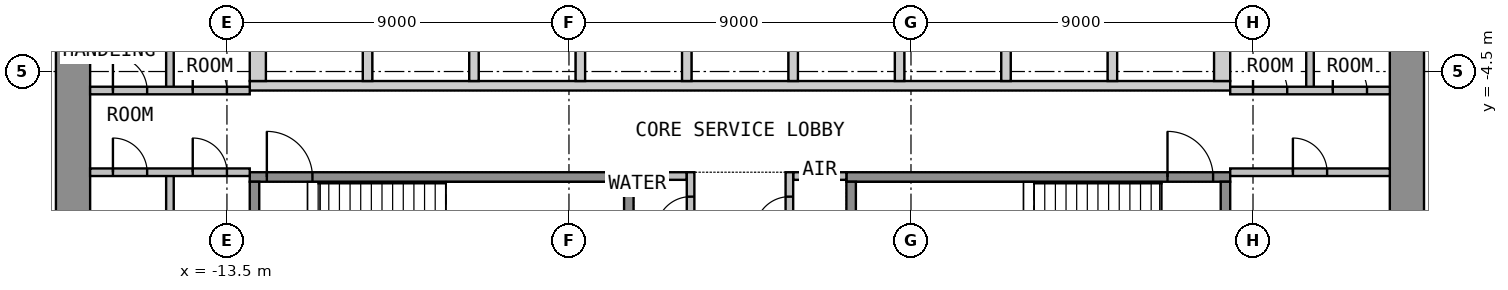
"""IFC4 building model, lengths in metres.
Left out: names, types, materials, properties, quantities, classifications, styles, units other than length and angle.
Written with IfcOpenShell. Run it as: python <this file> out.ifc"""

import sys

from ifc_helpers import new_model, si_unit, direction, frame, frame_2d, origin, place, context, subcontext, project, spatial, polyline, rectangle, outline, extrude, element, fill, save


model = new_model("IFC4")
c1 = context("Model", 3, precision=1e-05, world=origin(), true_north=direction((0.0, 1.0)))
c2 = subcontext(c1, "Body", "Model", "MODEL_VIEW")
j1 = project(units=[si_unit("LENGTHUNIT", "METRE"), si_unit("PLANEANGLEUNIT", "RADIAN")], contexts=[c1])
p1 = place(None, origin())
s1 = spatial("IfcSite", under=j1, at=p1, CompositionType="ELEMENT")
p2 = place(p1, origin())
s2 = spatial("IfcBuilding", under=s1, at=p2, CompositionType="ELEMENT")
p3 = place(p2, frame((0.0, 0.0, 76.8)))
s3 = spatial("IfcBuildingStorey", under=s2, at=p3, CompositionType="ELEMENT", Elevation=76.8)
p4 = place(p3, frame((-17.55, -12.6, 0.0), z_axis=(0.0, 0.0, 1.0), x_axis=(0.0, 1.0, 0.0)))
e1 = element("IfcWall", 1, at=p4, inside=s3, PredefinedType="SHEAR", context=c2, shape_type="SweptSolid", body=[
    extrude(rectangle(XDim=25.2, YDim=0.9, at=frame_2d((12.6, 0.0))), origin(), (0.0, 0.0, 1.0), 4.125),
])
p5 = place(p4, frame((11.4, 0.0, 0.0)))
e2 = element("IfcOpeningElement", 2, at=p5, cuts=e1, PredefinedType="OPENING", context=c2, shape_type="SweptSolid", body=[
    extrude(rectangle(XDim=2.4, YDim=2.1, at=frame_2d((1.2, 1.05))), frame((0.0, 0.46, 0.0), z_axis=(0.0, -1.0, 0.0), x_axis=(1.0, 0.0, 0.0)), (0.0, 0.0, 1.0), 0.92),
])
p6 = place(p3, frame((17.55, -12.6, 0.0), z_axis=(0.0, 0.0, 1.0), x_axis=(0.0, 1.0, 0.0)))
e3 = element("IfcWall", 3, at=p6, inside=s3, PredefinedType="SHEAR", context=c2, shape_type="SweptSolid", body=[
    extrude(rectangle(XDim=25.2, YDim=0.9, at=frame_2d((12.6, 0.0))), origin(), (0.0, 0.0, 1.0), 4.125),
])
p7 = place(p6, frame((11.4, 0.0, 0.0)))
e4 = element("IfcOpeningElement", 4, at=p7, cuts=e3, PredefinedType="OPENING", context=c2, shape_type="SweptSolid", body=[
    extrude(rectangle(XDim=2.4, YDim=2.1, at=frame_2d((1.2, 1.05))), frame((0.0, 0.46, 0.0), z_axis=(0.0, -1.0, 0.0), x_axis=(1.0, 0.0, 0.0)), (0.0, 0.0, 1.0), 0.92),
])
p8 = place(p3, origin())
e5 = element("IfcWall", 5, at=p8, inside=s3, PredefinedType="SHEAR", context=c2, shape_type="SweptSolid", body=[
    extrude(outline(polyline([(-12.9, -5.0), (12.9, -5.0), (12.9, -4.75), (-12.9, -4.75), (-12.9, -5.0)])), origin(), (0.0, 0.0, 1.0), 4.125),
])
p9 = place(p3, origin())
e6 = element("IfcWall", 6, at=p9, inside=s3, PredefinedType="SHEAR", context=c2, shape_type="SweptSolid", body=[
    extrude(outline(polyline([(-12.9, -4.75), (-12.475, -4.75), (-12.475, -2.05), (-12.9, -2.05), (-12.9, -4.75)])), origin(), (0.0, 0.0, 1.0), 4.125),
])
p10 = place(p3, origin())
e7 = element("IfcWall", 7, at=p10, inside=s3, PredefinedType="SHEAR", context=c2, shape_type="SweptSolid", body=[
    extrude(outline(polyline([(-9.925, -4.75), (-9.675, -4.75), (-9.675, -2.05), (-9.925, -2.05), (-9.925, -4.75)])), origin(), (0.0, 0.0, 1.0), 4.125),
])
p11 = place(p3, origin())
e8 = element("IfcWall", 8, at=p11, inside=s3, PredefinedType="SHEAR", context=c2, shape_type="SweptSolid", body=[
    extrude(outline(polyline([(-7.125, -4.75), (-6.875, -4.75), (-6.875, -2.05), (-7.125, -2.05), (-7.125, -4.75)])), origin(), (0.0, 0.0, 1.0), 4.125),
])
p12 = place(p3, origin())
e9 = element("IfcWall", 9, at=p12, inside=s3, PredefinedType="SHEAR", context=c2, shape_type="SweptSolid", body=[
    extrude(outline(polyline([(-4.325, -4.75), (-4.075, -4.75), (-4.075, -2.05), (-4.325, -2.05), (-4.325, -4.75)])), origin(), (0.0, 0.0, 1.0), 4.125),
])
p13 = place(p3, origin())
e10 = element("IfcWall", 10, at=p13, inside=s3, PredefinedType="SHEAR", context=c2, shape_type="SweptSolid", body=[
    extrude(outline(polyline([(-1.525, -4.75), (-1.275, -4.75), (-1.275, -2.05), (-1.525, -2.05), (-1.525, -4.75)])), origin(), (0.0, 0.0, 1.0), 4.125),
])
p14 = place(p3, origin())
e11 = element("IfcWall", 11, at=p14, inside=s3, PredefinedType="SHEAR", context=c2, shape_type="SweptSolid", body=[
    extrude(outline(polyline([(1.275, -4.75), (1.525, -4.75), (1.525, -2.05), (1.275, -2.05), (1.275, -4.75)])), origin(), (0.0, 0.0, 1.0), 4.125),
])
p15 = place(p3, origin())
e12 = element("IfcWall", 12, at=p15, inside=s3, PredefinedType="SHEAR", context=c2, shape_type="SweptSolid", body=[
    extrude(outline(polyline([(4.075, -4.75), (4.325, -4.75), (4.325, -2.05), (4.075, -2.05), (4.075, -4.75)])), origin(), (0.0, 0.0, 1.0), 4.125),
])
p16 = place(p3, origin())
e13 = element("IfcWall", 13, at=p16, inside=s3, PredefinedType="SHEAR", context=c2, shape_type="SweptSolid", body=[
    extrude(outline(polyline([(6.875, -4.75), (7.125, -4.75), (7.125, -2.05), (6.875, -2.05), (6.875, -4.75)])), origin(), (0.0, 0.0, 1.0), 4.125),
])
p17 = place(p3, origin())
e14 = element("IfcWall", 14, at=p17, inside=s3, PredefinedType="SHEAR", context=c2, shape_type="SweptSolid", body=[
    extrude(outline(polyline([(9.675, -4.75), (9.925, -4.75), (9.925, -2.05), (9.675, -2.05), (9.675, -4.75)])), origin(), (0.0, 0.0, 1.0), 4.125),
])
p18 = place(p3, origin())
e15 = element("IfcWall", 15, at=p18, inside=s3, PredefinedType="SHEAR", context=c2, shape_type="SweptSolid", body=[
    extrude(outline(polyline([(12.475, -4.75), (12.9, -4.75), (12.9, -2.05), (12.475, -2.05), (12.475, -4.75)])), origin(), (0.0, 0.0, 1.0), 4.125),
])
p19 = place(p3, frame((-12.9, -7.275, 0.0), z_axis=(0.0, 0.0, 1.0), x_axis=(1.0, 0.0, 0.0)))
e16 = element("IfcWall", 16, at=p19, inside=s3, PredefinedType="SHEAR", context=c2, shape_type="SweptSolid", body=[
    extrude(rectangle(XDim=10.1, YDim=0.25, at=frame_2d((5.05, 0.0))), origin(), (0.0, 0.0, 1.0), 4.125),
])
p20 = place(p19, frame((0.45, 0.0, 0.0)))
e17 = element("IfcOpeningElement", 17, at=p20, cuts=e16, PredefinedType="OPENING", context=c2, shape_type="SweptSolid", body=[
    extrude(rectangle(XDim=1.2, YDim=2.1, at=frame_2d((0.6, 1.05))), frame((0.0, 0.135, 0.0), z_axis=(0.0, -1.0, 0.0), x_axis=(1.0, 0.0, 0.0)), (0.0, 0.0, 1.0), 0.27),
])
for number, where, z_axis, x_axis in (
    (18, (-12.775, -10.65, 0.0), (0.0, 0.0, 1.0), (0.0, 1.0, 0.0)),
    (19, (-2.925, -10.65, 0.0), (0.0, 0.0, 1.0), (0.0, 1.0, 0.0)),
):
    element("IfcWall", number, at=place(p3, frame(where, z_axis=z_axis, x_axis=x_axis)), inside=s3, PredefinedType="SHEAR", context=c2, shape_type="SweptSolid", body=[
        extrude(rectangle(XDim=3.25, YDim=0.25, at=frame_2d((1.625, 0.0))), origin(), (0.0, 0.0, 1.0), 4.125),
    ])
p21 = place(p3, frame((2.8, -7.275, 0.0), z_axis=(0.0, 0.0, 1.0), x_axis=(1.0, 0.0, 0.0)))
e20 = element("IfcWall", 20, at=p21, inside=s3, PredefinedType="SHEAR", context=c2, shape_type="SweptSolid", body=[
    extrude(rectangle(XDim=10.1, YDim=0.25, at=frame_2d((5.05, 0.0))), origin(), (0.0, 0.0, 1.0), 4.125),
])
p22 = place(p21, frame((8.45, 0.0, 0.0)))
e21 = element("IfcOpeningElement", 21, at=p22, cuts=e20, PredefinedType="OPENING", context=c2, shape_type="SweptSolid", body=[
    extrude(rectangle(XDim=1.2, YDim=2.1, at=frame_2d((0.6, 1.05))), frame((0.0, 0.135, 0.0), z_axis=(0.0, -1.0, 0.0), x_axis=(1.0, 0.0, 0.0)), (0.0, 0.0, 1.0), 0.27),
])
for number, where, z_axis, x_axis in (
    (22, (2.925, -10.65, 0.0), (0.0, 0.0, 1.0), (0.0, 1.0, 0.0)),
    (23, (12.775, -10.65, 0.0), (0.0, 0.0, 1.0), (0.0, 1.0, 0.0)),
):
    element("IfcWall", number, at=place(p3, frame(where, z_axis=z_axis, x_axis=x_axis)), inside=s3, PredefinedType="SHEAR", context=c2, shape_type="SweptSolid", body=[
        extrude(rectangle(XDim=3.25, YDim=0.25, at=frame_2d((1.625, 0.0))), origin(), (0.0, 0.0, 1.0), 4.125),
    ])
for number, where, z_axis, x_axis in (
    (24, (-2.8, -7.25, 0.0), (0.0, 0.0, 1.0), (1.0, 0.0, 0.0)),
    (25, (1.4, -7.25, 0.0), (0.0, 0.0, 1.0), (1.0, 0.0, 0.0)),
):
    element("IfcWall", number, at=place(p3, frame(where, z_axis=z_axis, x_axis=x_axis)), inside=s3, PredefinedType="PARTITIONING", context=c2, shape_type="SweptSolid", body=[
        extrude(rectangle(XDim=1.4, YDim=0.2, at=frame_2d((0.7, 0.0))), origin(), (0.0, 0.0, 1.0), 4.125),
    ])
p23 = place(p3, frame((-1.3, -12.6, 0.0), z_axis=(0.0, 0.0, 1.0), x_axis=(0.0, 1.0, 0.0)))
e26 = element("IfcWall", 26, at=p23, inside=s3, PredefinedType="PARTITIONING", context=c2, shape_type="SweptSolid", body=[
    extrude(rectangle(XDim=5.45, YDim=0.2, at=frame_2d((2.725, 0.0))), origin(), (0.0, 0.0, 1.0), 4.125),
])
p24 = place(p23, frame((0.416, 0.0, 0.0)))
e27 = element("IfcOpeningElement", 27, at=p24, cuts=e26, PredefinedType="OPENING", context=c2, shape_type="SweptSolid", body=[
    extrude(rectangle(XDim=0.9, YDim=2.1, at=frame_2d((0.45, 1.05))), frame((0.0, 0.11, 0.0), z_axis=(0.0, -1.0, 0.0), x_axis=(1.0, 0.0, 0.0)), (0.0, 0.0, 1.0), 0.22),
])
p25 = place(p23, frame((2.149, 0.0, 0.0)))
e28 = element("IfcOpeningElement", 28, at=p25, cuts=e26, PredefinedType="OPENING", context=c2, shape_type="SweptSolid", body=[
    extrude(rectangle(XDim=0.9, YDim=2.1, at=frame_2d((0.45, 1.05))), frame((0.0, 0.11, 0.0), z_axis=(0.0, -1.0, 0.0), x_axis=(1.0, 0.0, 0.0)), (0.0, 0.0, 1.0), 0.22),
])
p26 = place(p23, frame((3.907, 0.0, 0.0)))
e29 = element("IfcOpeningElement", 29, at=p26, cuts=e26, PredefinedType="OPENING", context=c2, shape_type="SweptSolid", body=[
    extrude(rectangle(XDim=0.9, YDim=2.1, at=frame_2d((0.45, 1.05))), frame((0.0, 0.11, 0.0), z_axis=(0.0, -1.0, 0.0), x_axis=(1.0, 0.0, 0.0)), (0.0, 0.0, 1.0), 0.22),
])
p27 = place(p3, frame((1.3, -12.6, 0.0), z_axis=(0.0, 0.0, 1.0), x_axis=(0.0, 1.0, 0.0)))
e30 = element("IfcWall", 30, at=p27, inside=s3, PredefinedType="PARTITIONING", context=c2, shape_type="SweptSolid", body=[
    extrude(rectangle(XDim=5.45, YDim=0.2, at=frame_2d((2.725, 0.0))), origin(), (0.0, 0.0, 1.0), 4.125),
])
p28 = place(p27, frame((0.416, 0.0, 0.0)))
e31 = element("IfcOpeningElement", 31, at=p28, cuts=e30, PredefinedType="OPENING", context=c2, shape_type="SweptSolid", body=[
    extrude(rectangle(XDim=0.9, YDim=2.1, at=frame_2d((0.45, 1.05))), frame((0.0, 0.11, 0.0), z_axis=(0.0, -1.0, 0.0), x_axis=(1.0, 0.0, 0.0)), (0.0, 0.0, 1.0), 0.22),
])
p29 = place(p27, frame((2.149, 0.0, 0.0)))
e32 = element("IfcOpeningElement", 32, at=p29, cuts=e30, PredefinedType="OPENING", context=c2, shape_type="SweptSolid", body=[
    extrude(rectangle(XDim=0.9, YDim=2.1, at=frame_2d((0.45, 1.05))), frame((0.0, 0.11, 0.0), z_axis=(0.0, -1.0, 0.0), x_axis=(1.0, 0.0, 0.0)), (0.0, 0.0, 1.0), 0.22),
])
p30 = place(p27, frame((3.907, 0.0, 0.0)))
e33 = element("IfcOpeningElement", 33, at=p30, cuts=e30, PredefinedType="OPENING", context=c2, shape_type="SweptSolid", body=[
    extrude(rectangle(XDim=0.9, YDim=2.1, at=frame_2d((0.45, 1.05))), frame((0.0, 0.11, 0.0), z_axis=(0.0, -1.0, 0.0), x_axis=(1.0, 0.0, 0.0)), (0.0, 0.0, 1.0), 0.22),
])
p31 = place(p3, frame((-15.0, -12.6, 0.0), z_axis=(0.0, 0.0, 1.0), x_axis=(0.0, 1.0, 0.0)))
e34 = element("IfcWall", 34, at=p31, inside=s3, PredefinedType="PARTITIONING", context=c2, shape_type="SweptSolid", body=[
    extrude(rectangle(XDim=5.45, YDim=0.2, at=frame_2d((2.725, 0.0))), origin(), (0.0, 0.0, 1.0), 4.125),
])
p32 = place(p3, frame((-17.1, -7.15, 0.0), z_axis=(0.0, 0.0, 1.0), x_axis=(1.0, 0.0, 0.0)))
e35 = element("IfcWall", 35, at=p32, inside=s3, PredefinedType="PARTITIONING", context=c2, shape_type="SweptSolid", body=[
    extrude(rectangle(XDim=4.2, YDim=0.2, at=frame_2d((2.1, 0.0))), origin(), (0.0, 0.0, 1.0), 4.125),
])
p33 = place(p32, frame((0.6, 0.0, 0.0)))
e36 = element("IfcOpeningElement", 36, at=p33, cuts=e35, PredefinedType="OPENING", context=c2, shape_type="SweptSolid", body=[
    extrude(rectangle(XDim=0.9, YDim=2.1, at=frame_2d((0.45, 1.05))), frame((0.0, 0.11, 0.0), z_axis=(0.0, -1.0, 0.0), x_axis=(1.0, 0.0, 0.0)), (0.0, 0.0, 1.0), 0.22),
])
p34 = place(p32, frame((2.7, 0.0, 0.0)))
e37 = element("IfcOpeningElement", 37, at=p34, cuts=e35, PredefinedType="OPENING", context=c2, shape_type="SweptSolid", body=[
    extrude(rectangle(XDim=0.9, YDim=2.1, at=frame_2d((0.45, 1.05))), frame((0.0, 0.11, 0.0), z_axis=(0.0, -1.0, 0.0), x_axis=(1.0, 0.0, 0.0)), (0.0, 0.0, 1.0), 0.22),
])
p35 = place(p3, frame((-15.0, -5.0, 0.0), z_axis=(0.0, 0.0, 1.0), x_axis=(0.0, 1.0, 0.0)))
e38 = element("IfcWall", 38, at=p35, inside=s3, PredefinedType="PARTITIONING", context=c2, shape_type="SweptSolid", body=[
    extrude(rectangle(XDim=3.2, YDim=0.2, at=frame_2d((1.6, 0.0))), origin(), (0.0, 0.0, 1.0), 4.125),
])
p36 = place(p3, frame((-17.1, -5.0, 0.0), z_axis=(0.0, 0.0, 1.0), x_axis=(1.0, 0.0, 0.0)))
e39 = element("IfcWall", 39, at=p36, inside=s3, PredefinedType="PARTITIONING", context=c2, shape_type="SweptSolid", body=[
    extrude(rectangle(XDim=4.2, YDim=0.2, at=frame_2d((2.1, 0.0))), origin(), (0.0, 0.0, 1.0), 4.125),
])
p37 = place(p36, frame((0.6, 0.0, 0.0)))
e40 = element("IfcOpeningElement", 40, at=p37, cuts=e39, PredefinedType="OPENING", context=c2, shape_type="SweptSolid", body=[
    extrude(rectangle(XDim=0.9, YDim=2.1, at=frame_2d((0.45, 1.05))), frame((0.0, 0.11, 0.0), z_axis=(0.0, -1.0, 0.0), x_axis=(1.0, 0.0, 0.0)), (0.0, 0.0, 1.0), 0.22),
])
p38 = place(p36, frame((2.7, 0.0, 0.0)))
e41 = element("IfcOpeningElement", 41, at=p38, cuts=e39, PredefinedType="OPENING", context=c2, shape_type="SweptSolid", body=[
    extrude(rectangle(XDim=0.9, YDim=2.1, at=frame_2d((0.45, 1.05))), frame((0.0, 0.11, 0.0), z_axis=(0.0, -1.0, 0.0), x_axis=(1.0, 0.0, 0.0)), (0.0, 0.0, 1.0), 0.22),
])
p39 = place(p3, frame((12.9, -7.15, 0.0), z_axis=(0.0, 0.0, 1.0), x_axis=(1.0, 0.0, 0.0)))
e42 = element("IfcWall", 42, at=p39, inside=s3, PredefinedType="PARTITIONING", context=c2, shape_type="SweptSolid", body=[
    extrude(rectangle(XDim=4.2, YDim=0.2, at=frame_2d((2.1, 0.0))), origin(), (0.0, 0.0, 1.0), 4.125),
])
p40 = place(p39, frame((1.65, 0.0, 0.0)))
e43 = element("IfcOpeningElement", 43, at=p40, cuts=e42, PredefinedType="OPENING", context=c2, shape_type="SweptSolid", body=[
    extrude(rectangle(XDim=0.9, YDim=2.1, at=frame_2d((0.45, 1.05))), frame((0.0, 0.11, 0.0), z_axis=(0.0, -1.0, 0.0), x_axis=(1.0, 0.0, 0.0)), (0.0, 0.0, 1.0), 0.22),
])
p41 = place(p3, frame((15.0, -5.0, 0.0), z_axis=(0.0, 0.0, 1.0), x_axis=(0.0, 1.0, 0.0)))
e44 = element("IfcWall", 44, at=p41, inside=s3, PredefinedType="PARTITIONING", context=c2, shape_type="SweptSolid", body=[
    extrude(rectangle(XDim=3.2, YDim=0.2, at=frame_2d((1.6, 0.0))), origin(), (0.0, 0.0, 1.0), 4.125),
])
p42 = place(p3, frame((12.9, -5.0, 0.0), z_axis=(0.0, 0.0, 1.0), x_axis=(1.0, 0.0, 0.0)))
e45 = element("IfcWall", 45, at=p42, inside=s3, PredefinedType="PARTITIONING", context=c2, shape_type="SweptSolid", body=[
    extrude(rectangle(XDim=4.2, YDim=0.2, at=frame_2d((2.1, 0.0))), origin(), (0.0, 0.0, 1.0), 4.125),
])
p43 = place(p42, frame((0.6, 0.0, 0.0)))
e46 = element("IfcOpeningElement", 46, at=p43, cuts=e45, PredefinedType="OPENING", context=c2, shape_type="SweptSolid", body=[
    extrude(rectangle(XDim=0.9, YDim=2.1, at=frame_2d((0.45, 1.05))), frame((0.0, 0.11, 0.0), z_axis=(0.0, -1.0, 0.0), x_axis=(1.0, 0.0, 0.0)), (0.0, 0.0, 1.0), 0.22),
])
p44 = place(p42, frame((2.7, 0.0, 0.0)))
e47 = element("IfcOpeningElement", 47, at=p44, cuts=e45, PredefinedType="OPENING", context=c2, shape_type="SweptSolid", body=[
    extrude(rectangle(XDim=0.9, YDim=2.1, at=frame_2d((0.45, 1.05))), frame((0.0, 0.11, 0.0), z_axis=(0.0, -1.0, 0.0), x_axis=(1.0, 0.0, 0.0)), (0.0, 0.0, 1.0), 0.22),
])
p45 = place(p20, origin())
e48 = element("IfcDoor", 48, at=p45, inside=s3, OperationType="SINGLE_SWING_LEFT", PredefinedType="DOOR", context=c2, shape_type="SweptSolid", body=[
    extrude(rectangle(XDim=1.2, YDim=2.1, at=frame_2d((0.6, 1.05))), frame((0.0, 0.025, 0.0), z_axis=(0.0, -1.0, 0.0), x_axis=(1.0, 0.0, 0.0)), (0.0, 0.0, 1.0), 0.05),
])
fill(e17, e48)
p46 = place(p22, origin())
e49 = element("IfcDoor", 49, at=p46, inside=s3, OperationType="SINGLE_SWING_LEFT", PredefinedType="DOOR", context=c2, shape_type="SweptSolid", body=[
    extrude(rectangle(XDim=1.2, YDim=2.1, at=frame_2d((0.6, 1.05))), frame((0.0, 0.025, 0.0), z_axis=(0.0, -1.0, 0.0), x_axis=(1.0, 0.0, 0.0)), (0.0, 0.0, 1.0), 0.05),
])
fill(e21, e49)
p47 = place(p26, origin())
e50 = element("IfcDoor", 50, at=p47, inside=s3, OperationType="SINGLE_SWING_LEFT", PredefinedType="DOOR", context=c2, shape_type="SweptSolid", body=[
    extrude(rectangle(XDim=0.9, YDim=2.1, at=frame_2d((0.45, 1.05))), frame((0.0, 0.025, 0.0), z_axis=(0.0, -1.0, 0.0), x_axis=(1.0, 0.0, 0.0)), (0.0, 0.0, 1.0), 0.05),
])
fill(e29, e50)
p48 = place(p30, origin())
e51 = element("IfcDoor", 51, at=p48, inside=s3, OperationType="SINGLE_SWING_LEFT", PredefinedType="DOOR", context=c2, shape_type="SweptSolid", body=[
    extrude(rectangle(XDim=0.9, YDim=2.1, at=frame_2d((0.45, 1.05))), frame((0.0, 0.025, 0.0), z_axis=(0.0, -1.0, 0.0), x_axis=(1.0, 0.0, 0.0)), (0.0, 0.0, 1.0), 0.05),
])
fill(e33, e51)
p49 = place(p33, origin())
e52 = element("IfcDoor", 52, at=p49, inside=s3, OperationType="SINGLE_SWING_LEFT", PredefinedType="DOOR", context=c2, shape_type="SweptSolid", body=[
    extrude(rectangle(XDim=0.9, YDim=2.1, at=frame_2d((0.45, 1.05))), frame((0.0, 0.025, 0.0), z_axis=(0.0, -1.0, 0.0), x_axis=(1.0, 0.0, 0.0)), (0.0, 0.0, 1.0), 0.05),
])
fill(e36, e52)
p50 = place(p34, origin())
e53 = element("IfcDoor", 53, at=p50, inside=s3, OperationType="SINGLE_SWING_LEFT", PredefinedType="DOOR", context=c2, shape_type="SweptSolid", body=[
    extrude(rectangle(XDim=0.9, YDim=2.1, at=frame_2d((0.45, 1.05))), frame((0.0, 0.025, 0.0), z_axis=(0.0, -1.0, 0.0), x_axis=(1.0, 0.0, 0.0)), (0.0, 0.0, 1.0), 0.05),
])
fill(e37, e53)
p51 = place(p37, origin())
e54 = element("IfcDoor", 54, at=p51, inside=s3, OperationType="SINGLE_SWING_LEFT", PredefinedType="DOOR", context=c2, shape_type="SweptSolid", body=[
    extrude(rectangle(XDim=0.9, YDim=2.1, at=frame_2d((0.45, 1.05))), frame((0.0, 0.025, 0.0), z_axis=(0.0, -1.0, 0.0), x_axis=(1.0, 0.0, 0.0)), (0.0, 0.0, 1.0), 0.05),
])
fill(e40, e54)
p52 = place(p38, origin())
e55 = element("IfcDoor", 55, at=p52, inside=s3, OperationType="SINGLE_SWING_LEFT", PredefinedType="DOOR", context=c2, shape_type="SweptSolid", body=[
    extrude(rectangle(XDim=0.9, YDim=2.1, at=frame_2d((0.45, 1.05))), frame((0.0, 0.025, 0.0), z_axis=(0.0, -1.0, 0.0), x_axis=(1.0, 0.0, 0.0)), (0.0, 0.0, 1.0), 0.05),
])
fill(e41, e55)
p53 = place(p40, origin())
e56 = element("IfcDoor", 56, at=p53, inside=s3, OperationType="SINGLE_SWING_LEFT", PredefinedType="DOOR", context=c2, shape_type="SweptSolid", body=[
    extrude(rectangle(XDim=0.9, YDim=2.1, at=frame_2d((0.45, 1.05))), frame((0.0, 0.025, 0.0), z_axis=(0.0, -1.0, 0.0), x_axis=(1.0, 0.0, 0.0)), (0.0, 0.0, 1.0), 0.05),
])
fill(e43, e56)
p54 = place(p43, origin())
e57 = element("IfcDoor", 57, at=p54, inside=s3, OperationType="SINGLE_SWING_LEFT", PredefinedType="DOOR", context=c2, shape_type="SweptSolid", body=[
    extrude(rectangle(XDim=0.9, YDim=2.1, at=frame_2d((0.45, 1.05))), frame((0.0, 0.025, 0.0), z_axis=(0.0, -1.0, 0.0), x_axis=(1.0, 0.0, 0.0)), (0.0, 0.0, 1.0), 0.05),
])
fill(e46, e57)
p55 = place(p44, origin())
e58 = element("IfcDoor", 58, at=p55, inside=s3, OperationType="SINGLE_SWING_LEFT", PredefinedType="DOOR", context=c2, shape_type="SweptSolid", body=[
    extrude(rectangle(XDim=0.9, YDim=2.1, at=frame_2d((0.45, 1.05))), frame((0.0, 0.025, 0.0), z_axis=(0.0, -1.0, 0.0), x_axis=(1.0, 0.0, 0.0)), (0.0, 0.0, 1.0), 0.05),
])
fill(e47, e58)
save(model, sys.argv[1])
